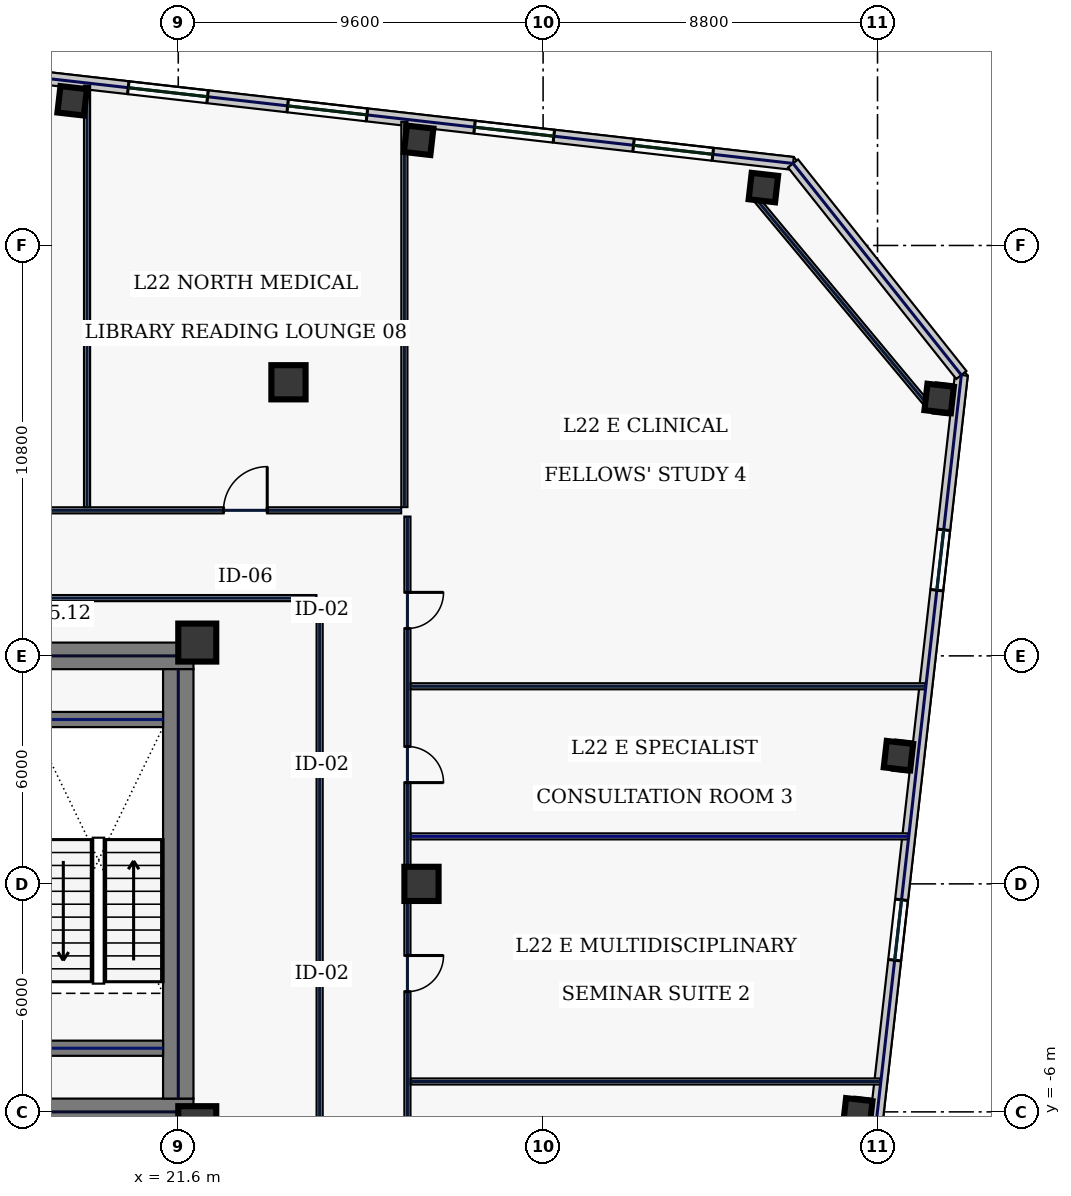
"""IFC4 building model, lengths in metres.
Left out: names, types, materials, properties, quantities, classifications, styles, units other than length and angle.
Written with IfcOpenShell. Run it as: python <this file> out.ifc"""

import sys

from ifc_helpers import new_model, si_unit, direction, frame, frame_2d, origin, origin_2d, place, context, subcontext, project, spatial, rectangle, hollow_rectangle, extrude, element, fill, save


model = new_model("IFC4")
c1 = context("Model", 3, precision=1e-05, world=origin(), true_north=direction((0.0, 1.0)))
c2 = subcontext(c1, "Body", "Model", "MODEL_VIEW")
j1 = project(units=[si_unit("LENGTHUNIT", "METRE"), si_unit("PLANEANGLEUNIT", "RADIAN")], contexts=[c1])
p1 = place(None, origin())
s1 = spatial("IfcSite", under=j1, at=p1, CompositionType="ELEMENT")
p2 = place(p1, origin())
s2 = spatial("IfcBuilding", under=s1, at=p2, CompositionType="ELEMENT")
p3 = place(p2, frame((0.0, 0.0, 101.4)))
s3 = spatial("IfcBuildingStorey", under=s2, at=p3, CompositionType="ELEMENT", Elevation=101.4)
for number, where, z_axis, x_axis in (
    (1, (10.45, 6.0, 0.0), (0.0, 0.0, 1.0), (1.0, 0.0, 0.0)),
    (2, (10.45, -6.0, 0.0), (0.0, 0.0, 1.0), (1.0, 0.0, 0.0)),
):
    element("IfcWall", number, at=place(p3, frame(where, z_axis=z_axis, x_axis=x_axis)), inside=s3, PredefinedType="SHEAR", context=c2, shape_type="SweptSolid", body=[
        extrude(rectangle(XDim=11.55, YDim=0.7, at=frame_2d((5.775, 0.0))), origin(), (0.0, 0.0, 1.0), 3.74),
    ])
p4 = place(p3, frame((21.6, -5.65, 0.0), z_axis=(0.0, 0.0, 1.0), x_axis=(0.0, 1.0, 0.0)))
e3 = element("IfcWall", 3, at=p4, inside=s3, PredefinedType="SHEAR", context=c2, shape_type="SweptSolid", body=[
    extrude(rectangle(XDim=11.3, YDim=0.8, at=frame_2d((5.65, 0.0))), origin(), (0.0, 0.0, 1.0), 3.74),
])
for number, where, z_axis, x_axis in (
    (4, (17.8, -4.325, 0.0), (0.0, 0.0, 1.0), (1.0, 0.0, 0.0)),
    (5, (17.8, 4.325, 0.0), (0.0, 0.0, 1.0), (1.0, 0.0, 0.0)),
):
    element("IfcWall", number, at=place(p3, frame(where, z_axis=z_axis, x_axis=x_axis)), inside=s3, PredefinedType="SHEAR", context=c2, shape_type="SweptSolid", body=[
        extrude(rectangle(XDim=3.4, YDim=0.4, at=frame_2d((1.7, 0.0))), origin(), (0.0, 0.0, 1.0), 3.74),
    ])
for number, where, z_axis, x_axis in (
    (6, (22.1, -6.35, 0.0), (0.0, 0.0, 1.0), (1.0, 0.0, 0.0)),
    (7, (22.1, 6.35, 0.0), (0.0, 0.0, 1.0), (1.0, 0.0, 0.0)),
):
    element("IfcColumn", number, at=place(p3, frame(where, z_axis=z_axis, x_axis=x_axis)), inside=s3, PredefinedType="COLUMN", context=c2, shape_type="SweptSolid", body=[
        extrude(hollow_rectangle(XDim=1.0, YDim=1.0, WallThickness=0.045, at=origin_2d()), origin(), (0.0, 0.0, 1.0), 3.74),
    ])
for number, where, z_axis, x_axis in (
    (8, (24.5, 13.2, 0.0), (0.0, 0.0, 1.0), (1.0, 0.0, 0.0)),
    (9, (28.0, 0.0, 0.0), (0.0, 0.0, 1.0), (1.0, 0.0, 0.0)),
):
    element("IfcColumn", number, at=place(p3, frame(where, z_axis=z_axis, x_axis=x_axis)), inside=s3, PredefinedType="COLUMN", context=c2, shape_type="SweptSolid", body=[
        extrude(hollow_rectangle(XDim=0.9, YDim=0.9, WallThickness=0.04, at=origin_2d()), origin(), (0.0, 0.0, 1.0), 3.74),
    ])
for number, where, z_axis, x_axis in (
    (10, (36.997, 18.323, 0.0), (0.0, 0.0, 1.0), (0.994, -0.113, 0.0)),
    (11, (27.926, 19.568, 0.0), (0.0, 0.0, 1.0), (0.994, -0.113, 0.0)),
    (12, (18.808, 20.607, 0.0), (0.0, 0.0, 1.0), (0.994, -0.113, 0.0)),
    (13, (39.48, -6.025, 0.0), (0.0, 0.0, 1.0), (0.994, -0.113, 0.0)),
    (14, (40.551, 3.375, 0.0), (0.0, 0.0, 1.0), (0.994, -0.113, 0.0)),
    (15, (41.622, 12.774, 0.0), (0.0, 0.0, 1.0), (0.994, -0.113, 0.0)),
):
    element("IfcColumn", number, at=place(p3, frame(where, z_axis=z_axis, x_axis=x_axis)), inside=s3, PredefinedType="COLUMN", context=c2, shape_type="SweptSolid", body=[
        extrude(hollow_rectangle(XDim=0.7, YDim=0.7, WallThickness=0.032, at=origin_2d()), origin(), (0.0, 0.0, 1.0), 3.74),
    ])
p5 = place(p3, frame((37.777, 18.958, 0.0), z_axis=(0.0, 0.0, 1.0), x_axis=(-0.993571362037, 0.113207546299, 0.0)))
e16 = element("IfcWall", 16, at=p5, inside=s3, PredefinedType="STANDARD", context=c2, shape_type="SweptSolid", body=[
    extrude(rectangle(XDim=21.223, YDim=0.34, at=frame_2d((10.611, 0.0))), origin(), (0.0, 0.0, 1.0), 3.74),
])
p6 = place(p5, frame((15.506, 0.0, 0.67)))
e17 = element("IfcOpeningElement", 17, at=p6, cuts=e16, PredefinedType="OPENING", context=c2, shape_type="SweptSolid", body=[
    extrude(rectangle(XDim=2.1, YDim=2.2, at=frame_2d((1.05, 1.1))), frame((0.0, 0.18, 0.0), z_axis=(0.0, -1.0, 0.0), x_axis=(1.0, 0.0, 0.0)), (0.0, 0.0, 1.0), 0.36),
])
p7 = place(p5, frame((11.285, 0.0, 0.67)))
e18 = element("IfcOpeningElement", 18, at=p7, cuts=e16, PredefinedType="OPENING", context=c2, shape_type="SweptSolid", body=[
    extrude(rectangle(XDim=2.1, YDim=2.2, at=frame_2d((1.05, 1.1))), frame((0.0, 0.18, 0.0), z_axis=(0.0, -1.0, 0.0), x_axis=(1.0, 0.0, 0.0)), (0.0, 0.0, 1.0), 0.36),
])
p8 = place(p5, frame((6.336, 0.0, 0.67)))
e19 = element("IfcOpeningElement", 19, at=p8, cuts=e16, PredefinedType="OPENING", context=c2, shape_type="SweptSolid", body=[
    extrude(rectangle(XDim=2.1, YDim=2.2, at=frame_2d((1.05, 1.1))), frame((0.0, 0.18, 0.0), z_axis=(0.0, -1.0, 0.0), x_axis=(1.0, 0.0, 0.0)), (0.0, 0.0, 1.0), 0.36),
])
p9 = place(p5, frame((2.125, 0.0, 0.67)))
e20 = element("IfcOpeningElement", 20, at=p9, cuts=e16, PredefinedType="OPENING", context=c2, shape_type="SweptSolid", body=[
    extrude(rectangle(XDim=2.1, YDim=2.2, at=frame_2d((1.05, 1.1))), frame((0.0, 0.18, 0.0), z_axis=(0.0, -1.0, 0.0), x_axis=(1.0, 0.0, 0.0)), (0.0, 0.0, 1.0), 0.36),
])
p10 = place(p3, frame((37.768, -25.556, 0.0), z_axis=(0.0, 0.0, 1.0), x_axis=(0.113201605824, 0.993572038877, 0.0)))
e21 = element("IfcWall", 21, at=p10, inside=s3, PredefinedType="STANDARD", context=c2, shape_type="SweptSolid", body=[
    extrude(rectangle(XDim=39.2, YDim=0.34, at=frame_2d((19.6, 0.0))), origin(), (0.0, 0.0, 1.0), 3.74),
])
p11 = place(p10, frame((4.1, 0.0, 0.58)))
e22 = element("IfcOpeningElement", 22, at=p11, cuts=e21, PredefinedType="OPENING", context=c2, shape_type="SweptSolid", body=[
    extrude(rectangle(XDim=1.6, YDim=2.3, at=frame_2d((0.8, 1.15))), frame((0.0, 0.18, 0.0), z_axis=(0.0, -1.0, 0.0), x_axis=(1.0, 0.0, 0.0)), (0.0, 0.0, 1.0), 0.36),
])
p12 = place(p10, frame((13.9, 0.0, 0.58)))
e23 = element("IfcOpeningElement", 23, at=p12, cuts=e21, PredefinedType="OPENING", context=c2, shape_type="SweptSolid", body=[
    extrude(rectangle(XDim=1.6, YDim=2.3, at=frame_2d((0.8, 1.15))), frame((0.0, 0.18, 0.0), z_axis=(0.0, -1.0, 0.0), x_axis=(1.0, 0.0, 0.0)), (0.0, 0.0, 1.0), 0.36),
])
p13 = place(p10, frame((23.7, 0.0, 0.58)))
e24 = element("IfcOpeningElement", 24, at=p13, cuts=e21, PredefinedType="OPENING", context=c2, shape_type="SweptSolid", body=[
    extrude(rectangle(XDim=1.6, YDim=2.3, at=frame_2d((0.8, 1.15))), frame((0.0, 0.18, 0.0), z_axis=(0.0, -1.0, 0.0), x_axis=(1.0, 0.0, 0.0)), (0.0, 0.0, 1.0), 0.36),
])
p14 = place(p10, frame((33.5, 0.0, 0.58)))
e25 = element("IfcOpeningElement", 25, at=p14, cuts=e21, PredefinedType="OPENING", context=c2, shape_type="SweptSolid", body=[
    extrude(rectangle(XDim=1.6, YDim=2.3, at=frame_2d((0.8, 1.15))), frame((0.0, 0.18, 0.0), z_axis=(0.0, -1.0, 0.0), x_axis=(1.0, 0.0, 0.0)), (0.0, 0.0, 1.0), 0.36),
])
p15 = place(p3, frame((42.206, 13.392, 0.0), z_axis=(0.0, 0.0, 1.0), x_axis=(-0.622524521309, 0.782600294128, 0.0)))
e26 = element("IfcWall", 26, at=p15, inside=s3, PredefinedType="STANDARD", context=c2, shape_type="SweptSolid", body=[
    extrude(rectangle(XDim=7.113, YDim=0.34, at=frame_2d((3.557, 0.0))), origin(), (0.0, 0.0, 1.0), 3.74),
])
p16 = place(p3, frame((41.361, 12.556, 0.0), z_axis=(0.0, 0.0, 1.0), x_axis=(-0.640217638562, 0.768193579298, 0.0)))
e27 = element("IfcWall", 27, at=p16, inside=s3, PredefinedType="PARTITIONING", context=c2, shape_type="SweptSolid", body=[
    extrude(rectangle(XDim=7.224, YDim=0.16, at=frame_2d((3.612, 0.0))), origin(), (0.0, 0.0, 1.0), 3.74),
])
p17 = place(p3, frame((-27.465, 9.83, 0.0), z_axis=(0.0, 0.0, 1.0), x_axis=(1.0, 0.0, 0.0)))
e28 = element("IfcWall", 28, at=p17, inside=s3, PredefinedType="PARTITIONING", context=c2, shape_type="SweptSolid", body=[
    extrude(rectangle(XDim=54.93, YDim=0.16, at=frame_2d((27.465, 0.0))), origin(), (0.0, 0.0, 1.0), 3.74),
])
p18 = place(p17, frame((2.044, 0.0, 0.0)))
e29 = element("IfcOpeningElement", 29, at=p18, cuts=e28, PredefinedType="OPENING", context=c2, shape_type="SweptSolid", body=[
    extrude(rectangle(XDim=1.05, YDim=2.2, at=frame_2d((0.525, 1.1))), frame((0.0, 0.09, 0.0), z_axis=(0.0, -1.0, 0.0), x_axis=(1.0, 0.0, 0.0)), (0.0, 0.0, 1.0), 0.18),
])
p19 = place(p17, frame((6.225, 0.0, 0.0)))
e30 = element("IfcOpeningElement", 30, at=p19, cuts=e28, PredefinedType="OPENING", context=c2, shape_type="SweptSolid", body=[
    extrude(rectangle(XDim=0.95, YDim=2.2, at=frame_2d((0.475, 1.1))), frame((0.0, 0.09, 0.0), z_axis=(0.0, -1.0, 0.0), x_axis=(1.0, 0.0, 0.0)), (0.0, 0.0, 1.0), 0.18),
])
p20 = place(p17, frame((11.875, 0.0, 0.0)))
e31 = element("IfcOpeningElement", 31, at=p20, cuts=e28, PredefinedType="OPENING", context=c2, shape_type="SweptSolid", body=[
    extrude(rectangle(XDim=0.95, YDim=2.2, at=frame_2d((0.475, 1.1))), frame((0.0, 0.09, 0.0), z_axis=(0.0, -1.0, 0.0), x_axis=(1.0, 0.0, 0.0)), (0.0, 0.0, 1.0), 0.18),
])
p21 = place(p17, frame((19.175, 0.0, 0.0)))
e32 = element("IfcOpeningElement", 32, at=p21, cuts=e28, PredefinedType="OPENING", context=c2, shape_type="SweptSolid", body=[
    extrude(rectangle(XDim=0.95, YDim=2.2, at=frame_2d((0.475, 1.1))), frame((0.0, 0.09, 0.0), z_axis=(0.0, -1.0, 0.0), x_axis=(1.0, 0.0, 0.0)), (0.0, 0.0, 1.0), 0.18),
])
p22 = place(p17, frame((26.775, 0.0, 0.0)))
e33 = element("IfcOpeningElement", 33, at=p22, cuts=e28, PredefinedType="OPENING", context=c2, shape_type="SweptSolid", body=[
    extrude(rectangle(XDim=0.95, YDim=2.2, at=frame_2d((0.475, 1.1))), frame((0.0, 0.09, 0.0), z_axis=(0.0, -1.0, 0.0), x_axis=(1.0, 0.0, 0.0)), (0.0, 0.0, 1.0), 0.18),
])
p23 = place(p17, frame((34.575, 0.0, 0.0)))
e34 = element("IfcOpeningElement", 34, at=p23, cuts=e28, PredefinedType="OPENING", context=c2, shape_type="SweptSolid", body=[
    extrude(rectangle(XDim=1.05, YDim=2.2, at=frame_2d((0.525, 1.1))), frame((0.0, 0.09, 0.0), z_axis=(0.0, -1.0, 0.0), x_axis=(1.0, 0.0, 0.0)), (0.0, 0.0, 1.0), 0.18),
])
p24 = place(p17, frame((42.375, 0.0, 0.0)))
e35 = element("IfcOpeningElement", 35, at=p24, cuts=e28, PredefinedType="OPENING", context=c2, shape_type="SweptSolid", body=[
    extrude(rectangle(XDim=0.95, YDim=2.2, at=frame_2d((0.475, 1.1))), frame((0.0, 0.09, 0.0), z_axis=(0.0, -1.0, 0.0), x_axis=(1.0, 0.0, 0.0)), (0.0, 0.0, 1.0), 0.18),
])
p25 = place(p17, frame((50.256, 0.0, 0.0)))
e36 = element("IfcOpeningElement", 36, at=p25, cuts=e28, PredefinedType="OPENING", context=c2, shape_type="SweptSolid", body=[
    extrude(rectangle(XDim=1.15, YDim=2.2, at=frame_2d((0.575, 1.1))), frame((0.0, 0.09, 0.0), z_axis=(0.0, -1.0, 0.0), x_axis=(1.0, 0.0, 0.0)), (0.0, 0.0, 1.0), 0.18),
])
p26 = place(p3, frame((27.63, 9.665, 0.0), z_axis=(0.0, 0.0, 1.0), x_axis=(0.0, -1.0, 0.0)))
e37 = element("IfcWall", 37, at=p26, inside=s3, PredefinedType="PARTITIONING", context=c2, shape_type="SweptSolid", body=[
    extrude(rectangle(XDim=19.28, YDim=0.16, at=frame_2d((9.64, 0.0))), origin(), (0.0, 0.0, 1.0), 3.74),
])
p27 = place(p26, frame((16.531, 0.0, 0.0)))
e38 = element("IfcOpeningElement", 38, at=p27, cuts=e37, PredefinedType="OPENING", context=c2, shape_type="SweptSolid", body=[
    extrude(rectangle(XDim=0.95, YDim=2.2, at=frame_2d((0.475, 1.1))), frame((0.0, 0.09, 0.0), z_axis=(0.0, -1.0, 0.0), x_axis=(1.0, 0.0, 0.0)), (0.0, 0.0, 1.0), 0.18),
])
p28 = place(p26, frame((11.55, 0.0, 0.0)))
e39 = element("IfcOpeningElement", 39, at=p28, cuts=e37, PredefinedType="OPENING", context=c2, shape_type="SweptSolid", body=[
    extrude(rectangle(XDim=0.95, YDim=2.2, at=frame_2d((0.475, 1.1))), frame((0.0, 0.09, 0.0), z_axis=(0.0, -1.0, 0.0), x_axis=(1.0, 0.0, 0.0)), (0.0, 0.0, 1.0), 0.18),
])
p29 = place(p26, frame((6.05, 0.0, 0.0)))
e40 = element("IfcOpeningElement", 40, at=p29, cuts=e37, PredefinedType="OPENING", context=c2, shape_type="SweptSolid", body=[
    extrude(rectangle(XDim=0.95, YDim=2.2, at=frame_2d((0.475, 1.1))), frame((0.0, 0.09, 0.0), z_axis=(0.0, -1.0, 0.0), x_axis=(1.0, 0.0, 0.0)), (0.0, 0.0, 1.0), 0.18),
])
p30 = place(p26, frame((1.994, 0.0, 0.0)))
e41 = element("IfcOpeningElement", 41, at=p30, cuts=e37, PredefinedType="OPENING", context=c2, shape_type="SweptSolid", body=[
    extrude(rectangle(XDim=0.95, YDim=2.2, at=frame_2d((0.475, 1.1))), frame((0.0, 0.09, 0.0), z_axis=(0.0, -1.0, 0.0), x_axis=(1.0, 0.0, 0.0)), (0.0, 0.0, 1.0), 0.18),
])
p31 = place(p3, frame((25.235, 7.52, 0.0), z_axis=(0.0, 0.0, 1.0), x_axis=(-1.0, 0.0, 0.0)))
e42 = element("IfcWall", 42, at=p31, inside=s3, PredefinedType="PARTITIONING", context=c2, shape_type="SweptSolid", body=[
    extrude(rectangle(XDim=14.57, YDim=0.16, at=frame_2d((7.285, 0.0))), origin(), (0.0, 0.0, 1.0), 3.74),
])
p32 = place(p3, frame((25.32, -7.385, 0.0), z_axis=(0.0, 0.0, 1.0), x_axis=(0.0, 1.0, 0.0)))
e43 = element("IfcWall", 43, at=p32, inside=s3, PredefinedType="PARTITIONING", context=c2, shape_type="SweptSolid", body=[
    extrude(rectangle(XDim=14.82, YDim=0.16, at=frame_2d((7.41, 0.0))), origin(), (0.0, 0.0, 1.0), 3.74),
])
p33 = place(p3, frame((27.55, 9.915, 0.0), z_axis=(0.0, 0.0, 1.0), x_axis=(0.0, 1.0, 0.0)))
e44 = element("IfcWall", 44, at=p33, inside=s3, PredefinedType="PARTITIONING", context=c2, shape_type="SweptSolid", body=[
    extrude(rectangle(XDim=10.138, YDim=0.16, at=frame_2d((5.069, 0.0))), origin(), (0.0, 0.0, 1.0), 3.74),
])
p34 = place(p3, frame((19.2, 9.915, 0.0), z_axis=(0.0, 0.0, 1.0), x_axis=(0.0, 1.0, 0.0)))
e45 = element("IfcWall", 45, at=p34, inside=s3, PredefinedType="PARTITIONING", context=c2, shape_type="SweptSolid", body=[
    extrude(rectangle(XDim=11.09, YDim=0.16, at=frame_2d((5.545, 0.0))), origin(), (0.0, 0.0, 1.0), 3.74),
])
p35 = place(p3, frame((27.715, -5.2, 0.0), z_axis=(0.0, 0.0, 1.0), x_axis=(1.0, 0.0, 0.0)))
e46 = element("IfcWall", 46, at=p35, inside=s3, PredefinedType="PARTITIONING", context=c2, shape_type="SweptSolid", body=[
    extrude(rectangle(XDim=12.352, YDim=0.16, at=frame_2d((6.176, 0.0))), origin(), (0.0, 0.0, 1.0), 3.74),
])
p36 = place(p3, frame((27.715, 1.25, 0.0), z_axis=(0.0, 0.0, 1.0), x_axis=(1.0, 0.0, 0.0)))
e47 = element("IfcWall", 47, at=p36, inside=s3, PredefinedType="PARTITIONING", context=c2, shape_type="SweptSolid", body=[
    extrude(rectangle(XDim=13.087, YDim=0.16, at=frame_2d((6.543, 0.0))), origin(), (0.0, 0.0, 1.0), 3.235),
])
p37 = place(p3, frame((27.715, 5.2, 0.0), z_axis=(0.0, 0.0, 1.0), x_axis=(1.0, 0.0, 0.0)))
e48 = element("IfcWall", 48, at=p37, inside=s3, PredefinedType="PARTITIONING", context=c2, shape_type="SweptSolid", body=[
    extrude(rectangle(XDim=13.537, YDim=0.16, at=frame_2d((6.769, 0.0))), origin(), (0.0, 0.0, 1.0), 3.74),
])
p38 = place(p6, origin())
e49 = element("IfcWindow", 49, at=p38, inside=s3, PartitioningType="SINGLE_PANEL", PredefinedType="WINDOW", context=c2, shape_type="SweptSolid", body=[
    extrude(rectangle(XDim=2.1, YDim=2.2, at=frame_2d((1.05, 1.1))), frame((0.0, 0.03, 0.0), z_axis=(0.0, -1.0, 0.0), x_axis=(1.0, 0.0, 0.0)), (0.0, 0.0, 1.0), 0.06),
])
fill(e17, e49)
p39 = place(p7, origin())
e50 = element("IfcWindow", 50, at=p39, inside=s3, PartitioningType="SINGLE_PANEL", PredefinedType="WINDOW", context=c2, shape_type="SweptSolid", body=[
    extrude(rectangle(XDim=2.1, YDim=2.2, at=frame_2d((1.05, 1.1))), frame((0.0, 0.03, 0.0), z_axis=(0.0, -1.0, 0.0), x_axis=(1.0, 0.0, 0.0)), (0.0, 0.0, 1.0), 0.06),
])
fill(e18, e50)
p40 = place(p8, origin())
e51 = element("IfcWindow", 51, at=p40, inside=s3, PartitioningType="SINGLE_PANEL", PredefinedType="WINDOW", context=c2, shape_type="SweptSolid", body=[
    extrude(rectangle(XDim=2.1, YDim=2.2, at=frame_2d((1.05, 1.1))), frame((0.0, 0.03, 0.0), z_axis=(0.0, -1.0, 0.0), x_axis=(1.0, 0.0, 0.0)), (0.0, 0.0, 1.0), 0.06),
])
fill(e19, e51)
p41 = place(p9, origin())
e52 = element("IfcWindow", 52, at=p41, inside=s3, PartitioningType="SINGLE_PANEL", PredefinedType="WINDOW", context=c2, shape_type="SweptSolid", body=[
    extrude(rectangle(XDim=2.1, YDim=2.2, at=frame_2d((1.05, 1.1))), frame((0.0, 0.03, 0.0), z_axis=(0.0, -1.0, 0.0), x_axis=(1.0, 0.0, 0.0)), (0.0, 0.0, 1.0), 0.06),
])
fill(e20, e52)
p42 = place(p13, origin())
e53 = element("IfcWindow", 53, at=p42, inside=s3, PartitioningType="SINGLE_PANEL", PredefinedType="WINDOW", context=c2, shape_type="SweptSolid", body=[
    extrude(rectangle(XDim=1.6, YDim=2.3, at=frame_2d((0.8, 1.15))), frame((0.0, 0.03, 0.0), z_axis=(0.0, -1.0, 0.0), x_axis=(1.0, 0.0, 0.0)), (0.0, 0.0, 1.0), 0.06),
])
fill(e24, e53)
p43 = place(p14, origin())
e54 = element("IfcWindow", 54, at=p43, inside=s3, PartitioningType="SINGLE_PANEL", PredefinedType="WINDOW", context=c2, shape_type="SweptSolid", body=[
    extrude(rectangle(XDim=1.6, YDim=2.3, at=frame_2d((0.8, 1.15))), frame((0.0, 0.03, 0.0), z_axis=(0.0, -1.0, 0.0), x_axis=(1.0, 0.0, 0.0)), (0.0, 0.0, 1.0), 0.06),
])
fill(e25, e54)
p44 = place(p25, origin())
e55 = element("IfcDoor", 55, at=p44, inside=s3, OperationType="SINGLE_SWING_RIGHT", PredefinedType="DOOR", context=c2, shape_type="SweptSolid", body=[
    extrude(rectangle(XDim=1.15, YDim=2.2, at=frame_2d((0.575, 1.1))), frame((0.0, 0.025, 0.0), z_axis=(0.0, -1.0, 0.0), x_axis=(1.0, 0.0, 0.0)), (0.0, 0.0, 1.0), 0.05),
])
fill(e36, e55)
p45 = place(p28, origin())
e56 = element("IfcDoor", 56, at=p45, inside=s3, OperationType="SINGLE_SWING_LEFT", PredefinedType="DOOR", context=c2, shape_type="SweptSolid", body=[
    extrude(rectangle(XDim=0.95, YDim=2.2, at=frame_2d((0.475, 1.1))), frame((0.0, 0.025, 0.0), z_axis=(0.0, -1.0, 0.0), x_axis=(1.0, 0.0, 0.0)), (0.0, 0.0, 1.0), 0.05),
])
fill(e39, e56)
p46 = place(p29, origin())
e57 = element("IfcDoor", 57, at=p46, inside=s3, OperationType="SINGLE_SWING_RIGHT", PredefinedType="DOOR", context=c2, shape_type="SweptSolid", body=[
    extrude(rectangle(XDim=0.95, YDim=2.2, at=frame_2d((0.475, 1.1))), frame((0.0, 0.025, 0.0), z_axis=(0.0, -1.0, 0.0), x_axis=(1.0, 0.0, 0.0)), (0.0, 0.0, 1.0), 0.05),
])
fill(e40, e57)
p47 = place(p30, origin())
e58 = element("IfcDoor", 58, at=p47, inside=s3, OperationType="SINGLE_SWING_LEFT", PredefinedType="DOOR", context=c2, shape_type="SweptSolid", body=[
    extrude(rectangle(XDim=0.95, YDim=2.2, at=frame_2d((0.475, 1.1))), frame((0.0, 0.025, 0.0), z_axis=(0.0, -1.0, 0.0), x_axis=(1.0, 0.0, 0.0)), (0.0, 0.0, 1.0), 0.05),
])
fill(e41, e58)
save(model, sys.argv[1])
